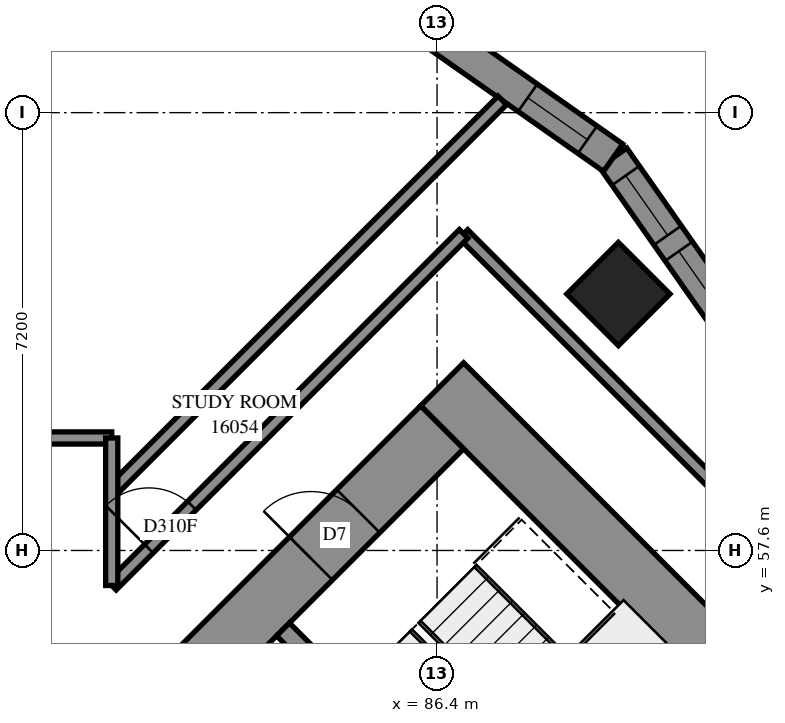
"""IFC4 building model, lengths in metres.
Left out: names, types, materials, properties, quantities, classifications, styles, units other than length and angle.
Written with IfcOpenShell. Run it as: python <this file> out.ifc"""

import sys

from ifc_helpers import new_model, si_unit, direction, frame, frame_2d, origin, origin_2d, place, context, subcontext, project, spatial, polyline, rectangle, outline, extrude, element, fill, save


model = new_model("IFC4")
c1 = context("Model", 3, precision=1e-05, world=origin(), true_north=direction((0.0, 1.0)))
c2 = subcontext(c1, "Body", "Model", "MODEL_VIEW")
j1 = project(units=[si_unit("LENGTHUNIT", "METRE"), si_unit("PLANEANGLEUNIT", "RADIAN")], contexts=[c1])
p1 = place(None, origin())
s1 = spatial("IfcSite", under=j1, at=p1, CompositionType="ELEMENT")
p2 = place(p1, origin())
s2 = spatial("IfcBuilding", under=s1, at=p2, CompositionType="ELEMENT")
p3 = place(p2, frame((0.0, 0.0, 61.0)))
s3 = spatial("IfcBuildingStorey", under=s2, at=p3, CompositionType="ELEMENT", Elevation=61.0)
p4 = place(p3, frame((89.382, 61.818, 0.0), z_axis=(0.0, 0.0, 1.0), x_axis=(0.7071067812, -0.7071067812, 0.0)))
e1 = element("IfcColumn", 1, at=p4, inside=s3, PredefinedType="COLUMN", context=c2, shape_type="SweptSolid", body=[
    extrude(rectangle(XDim=1.2, YDim=1.2, at=origin_2d()), origin(), (0.0, 0.0, 1.0), 3.1),
])
p5 = place(p3, frame((86.483, 60.333, -0.3), z_axis=(0.0, 0.0, 1.0), x_axis=(0.70710983, -0.7071037324, 0.0)))
e2 = element("IfcWall", 2, at=p5, inside=s3, PredefinedType="SHEAR", context=c2, shape_type="SweptSolid", body=[
    extrude(rectangle(XDim=16.4, YDim=1.0, at=frame_2d((8.2, 0.0))), origin(), (0.0, 0.0, 1.0), 2.7),
])
p6 = place(p5, frame((11.0, 0.0, 0.3)))
e3 = element("IfcOpeningElement", 3, at=p6, cuts=e2, PredefinedType="OPENING", context=c2, shape_type="SweptSolid", body=[
    extrude(rectangle(XDim=0.8, YDim=2.1, at=frame_2d((0.4, 1.05))), frame((0.0, 0.51, 0.0), z_axis=(0.0, -1.0, 0.0), x_axis=(1.0, 0.0, 0.0)), (0.0, 0.0, 1.0), 1.02),
])
p7 = place(p3, frame((76.301, 49.443, -0.3), z_axis=(0.0, 0.0, 1.0), x_axis=(0.7071067812, 0.7071067812, 0.0)))
e4 = element("IfcWall", 4, at=p7, inside=s3, PredefinedType="SHEAR", context=c2, shape_type="SweptSolid", body=[
    extrude(rectangle(XDim=14.4, YDim=1.0, at=frame_2d((7.2, 0.0))), origin(), (0.0, 0.0, 1.0), 2.7),
])
p8 = place(p7, frame((4.55, 0.0, 0.3)))
e5 = element("IfcOpeningElement", 5, at=p8, cuts=e4, PredefinedType="OPENING", context=c2, shape_type="SweptSolid", body=[
    extrude(rectangle(XDim=1.1, YDim=2.1, at=frame_2d((0.55, 1.05))), frame((0.0, 0.51, 0.0), z_axis=(0.0, -1.0, 0.0), x_axis=(1.0, 0.0, 0.0)), (0.0, 0.0, 1.0), 1.02),
])
p9 = place(p7, frame((11.35, 0.0, 0.3)))
e6 = element("IfcOpeningElement", 6, at=p9, cuts=e4, PredefinedType="OPENING", context=c2, shape_type="SweptSolid", body=[
    extrude(rectangle(XDim=1.1, YDim=2.1, at=frame_2d((0.55, 1.05))), frame((0.0, 0.51, 0.0), z_axis=(0.0, -1.0, 0.0), x_axis=(1.0, 0.0, 0.0)), (0.0, 0.0, 1.0), 1.02),
])
p10 = place(p3, frame((83.867, 56.302, 0.0), z_axis=(0.0, 0.0, 1.0), x_axis=(0.7071137256, -0.7070998367, 0.0)))
e7 = element("IfcWall", 7, at=p10, inside=s3, PredefinedType="SOLIDWALL", context=c2, shape_type="SweptSolid", body=[
    extrude(rectangle(XDim=7.2, YDim=0.3, at=frame_2d((3.6, 0.0))), origin(), (0.0, 0.0, 1.0), 3.1),
])
p11 = place(p3, frame((91.3, 61.203, 0.0), z_axis=(0.0, 0.0, 1.0), x_axis=(-0.5742967275, 0.8186472188, 0.0)))
e8 = element("IfcWall", 8, at=p11, inside=s3, PredefinedType="SOLIDWALL", context=c2, shape_type="SweptSolid", body=[
    extrude(outline(polyline([(0.048, -0.275), (3.538, -0.275), (3.442, 0.275), (-0.048, 0.275), (0.048, -0.275)])), origin(), (0.0, 0.0, 1.0), 3.1),
])
p12 = place(p11, frame((0.409, 0.0, 0.5)))
e9 = element("IfcOpeningElement", 9, at=p12, cuts=e8, PredefinedType="OPENING", context=c2, shape_type="SweptSolid", body=[
    extrude(rectangle(XDim=1.2, YDim=2.45, at=frame_2d((0.6, 1.225))), frame((0.0, 0.285, 0.0), z_axis=(0.0, -1.0, 0.0), x_axis=(1.0, 0.0, 0.0)), (0.0, 0.0, 1.0), 0.57),
])
p13 = place(p11, frame((1.93, 0.0, 0.5)))
e10 = element("IfcOpeningElement", 10, at=p13, cuts=e8, PredefinedType="OPENING", context=c2, shape_type="SweptSolid", body=[
    extrude(rectangle(XDim=1.2, YDim=2.45, at=frame_2d((0.6, 1.225))), frame((0.0, 0.285, 0.0), z_axis=(0.0, -1.0, 0.0), x_axis=(1.0, 0.0, 0.0)), (0.0, 0.0, 1.0), 0.57),
])
p14 = place(p3, frame((89.296, 64.059, 0.0), z_axis=(0.0, 0.0, 1.0), x_axis=(-0.8186566697, 0.5742832552, 0.0)))
e11 = element("IfcWall", 11, at=p14, inside=s3, PredefinedType="SOLIDWALL", context=c2, shape_type="SweptSolid", body=[
    extrude(outline(polyline([(-0.048, -0.275), (3.442, -0.275), (3.538, 0.275), (0.048, 0.275), (-0.048, -0.275)])), origin(), (0.0, 0.0, 1.0), 3.1),
])
p15 = place(p14, frame((0.516, 0.0, 0.5)))
e12 = element("IfcOpeningElement", 12, at=p15, cuts=e11, PredefinedType="OPENING", context=c2, shape_type="SweptSolid", body=[
    extrude(rectangle(XDim=1.2, YDim=2.45, at=frame_2d((0.6, 1.225))), frame((0.0, 0.285, 0.0), z_axis=(0.0, -1.0, 0.0), x_axis=(1.0, 0.0, 0.0)), (0.0, 0.0, 1.0), 0.57),
])
p16 = place(p3, frame((86.833, 62.805, 0.0), z_axis=(0.0, 0.0, 1.0), x_axis=(0.7072045138, -0.7070090351, 0.0)))
e13 = element("IfcWall", 13, at=p16, inside=s3, PredefinedType="PARTITIONING", context=c2, shape_type="SweptSolid", body=[
    extrude(rectangle(XDim=13.301, YDim=0.2, at=frame_2d((6.65, 0.0))), origin(), (0.0, 0.0, 1.0), 3.1),
])
p17 = place(p16, frame((10.586, 0.0, 0.0)))
e14 = element("IfcOpeningElement", 14, at=p17, cuts=e13, PredefinedType="OPENING", context=c2, shape_type="SweptSolid", body=[
    extrude(rectangle(XDim=1.0, YDim=2.1, at=frame_2d((0.5, 1.05))), frame((0.0, 0.11, 0.0), z_axis=(0.0, -1.0, 0.0), x_axis=(1.0, 0.0, 0.0)), (0.0, 0.0, 1.0), 0.22),
])
p18 = place(p3, frame((81.049, 58.577, 0.0), z_axis=(0.0, 0.0, 1.0), x_axis=(0.7071067812, 0.7071067812, 0.0)))
e15 = element("IfcWall", 15, at=p18, inside=s3, PredefinedType="PARTITIONING", context=c2, shape_type="SweptSolid", body=[
    extrude(rectangle(XDim=9.086, YDim=0.2, at=frame_2d((4.543, 0.0))), origin(), (0.0, 0.0, 1.0), 3.1),
])
p19 = place(p3, frame((81.053, 57.021, 0.0), z_axis=(0.0, 0.0, 1.0), x_axis=(0.7069845395, 0.7072290017, 0.0)))
e16 = element("IfcWall", 16, at=p19, inside=s3, PredefinedType="PARTITIONING", context=c2, shape_type="SweptSolid", body=[
    extrude(rectangle(XDim=8.181, YDim=0.2, at=frame_2d((4.091, 0.0))), origin(), (0.0, 0.0, 1.0), 3.1),
])
p20 = place(p19, frame((0.86, 0.0, 0.0)))
e17 = element("IfcOpeningElement", 17, at=p20, cuts=e16, PredefinedType="OPENING", context=c2, shape_type="SweptSolid", body=[
    extrude(rectangle(XDim=1.0, YDim=2.1, at=frame_2d((0.5, 1.05))), frame((0.0, 0.11, 0.0), z_axis=(0.0, -1.0, 0.0), x_axis=(1.0, 0.0, 0.0)), (0.0, 0.0, 1.0), 0.22),
])
p21 = place(p3, frame((77.352, 59.45, 0.0), z_axis=(0.0, 0.0, 1.0), x_axis=(1.0, 0.0, 0.0)))
e18 = element("IfcWall", 18, at=p21, inside=s3, PredefinedType="PARTITIONING", context=c2, shape_type="SweptSolid", body=[
    extrude(rectangle(XDim=3.698, YDim=0.2, at=frame_2d((1.849, 0.0))), origin(), (0.0, 0.0, 1.0), 3.1),
])
p22 = place(p3, frame((81.05, 57.024, 0.0), z_axis=(0.0, 0.0, 1.0), x_axis=(0.0, 1.0, 0.0)))
e19 = element("IfcWall", 19, at=p22, inside=s3, PredefinedType="PARTITIONING", context=c2, shape_type="SweptSolid", body=[
    extrude(rectangle(XDim=2.426, YDim=0.2, at=frame_2d((1.213, 0.0))), origin(), (0.0, 0.0, 1.0), 3.1),
])
p23 = place(p12, origin())
e20 = element("IfcWindow", 20, at=p23, inside=s3, PartitioningType="SINGLE_PANEL", PredefinedType="WINDOW", context=c2, shape_type="SweptSolid", body=[
    extrude(rectangle(XDim=1.2, YDim=2.45, at=frame_2d((0.6, 1.225))), frame((0.0, 0.155, 0.0), z_axis=(0.0, -1.0, 0.0), x_axis=(1.0, 0.0, 0.0)), (0.0, 0.0, 1.0), 0.06),
])
fill(e9, e20)
p24 = place(p13, origin())
e21 = element("IfcWindow", 21, at=p24, inside=s3, PartitioningType="SINGLE_PANEL", PredefinedType="WINDOW", context=c2, shape_type="SweptSolid", body=[
    extrude(rectangle(XDim=1.2, YDim=2.45, at=frame_2d((0.6, 1.225))), frame((0.0, 0.155, 0.0), z_axis=(0.0, -1.0, 0.0), x_axis=(1.0, 0.0, 0.0)), (0.0, 0.0, 1.0), 0.06),
])
fill(e10, e21)
p25 = place(p15, origin())
e22 = element("IfcWindow", 22, at=p25, inside=s3, PartitioningType="SINGLE_PANEL", PredefinedType="WINDOW", context=c2, shape_type="SweptSolid", body=[
    extrude(rectangle(XDim=1.2, YDim=2.45, at=frame_2d((0.6, 1.225))), frame((0.0, 0.155, 0.0), z_axis=(0.0, -1.0, 0.0), x_axis=(1.0, 0.0, 0.0)), (0.0, 0.0, 1.0), 0.06),
])
fill(e12, e22)
p26 = place(p9, origin())
e23 = element("IfcDoor", 23, at=p26, inside=s3, OperationType="SINGLE_SWING_LEFT", PredefinedType="DOOR", context=c2, shape_type="SweptSolid", body=[
    extrude(rectangle(XDim=1.1, YDim=2.1, at=frame_2d((0.55, 1.05))), frame((0.0, 0.025, 0.0), z_axis=(0.0, -1.0, 0.0), x_axis=(1.0, 0.0, 0.0)), (0.0, 0.0, 1.0), 0.05),
])
fill(e6, e23)
p27 = place(p20, origin())
e24 = element("IfcDoor", 24, at=p27, inside=s3, OperationType="SINGLE_SWING_RIGHT", PredefinedType="DOOR", context=c2, shape_type="SweptSolid", body=[
    extrude(rectangle(XDim=1.0, YDim=2.1, at=frame_2d((0.5, 1.05))), frame((0.0, 0.025, 0.0), z_axis=(0.0, -1.0, 0.0), x_axis=(1.0, 0.0, 0.0)), (0.0, 0.0, 1.0), 0.05),
])
fill(e17, e24)
save(model, sys.argv[1])
